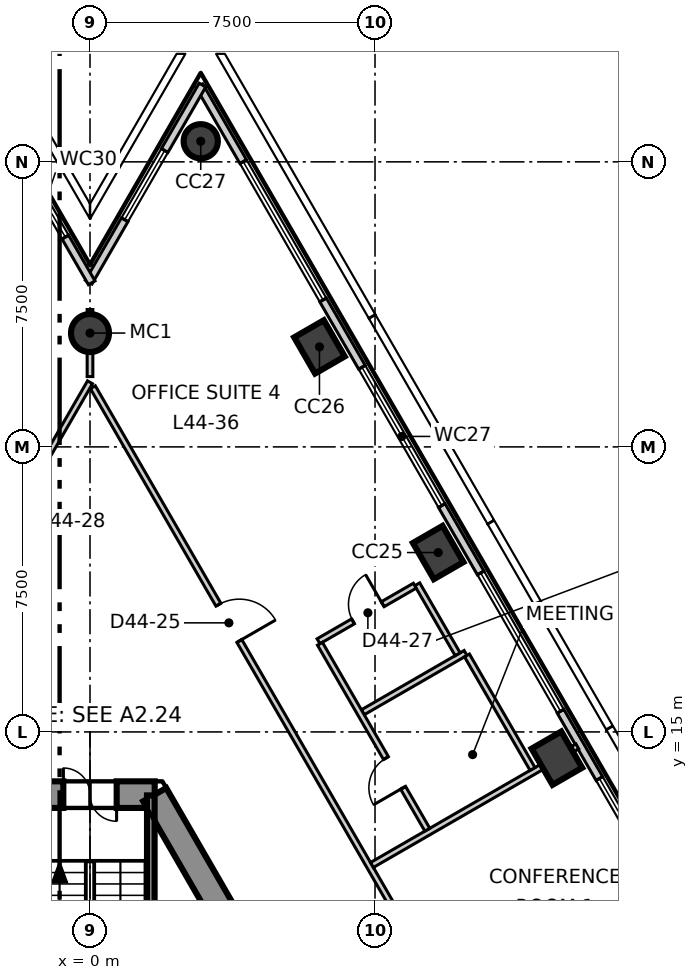
"""IFC4 building model, lengths in metres.
Left out: names, types, materials, properties, quantities, classifications, styles, units other than length and angle.
Written with IfcOpenShell. Run it as: python <this file> out.ifc"""

import sys

from ifc_helpers import new_model, si_unit, direction, frame, frame_2d, origin, origin_2d, place, context, subcontext, project, spatial, polyline, rectangle, circle, outline, extrude, element, fill, save


model = new_model("IFC4")
c1 = context("Model", 3, precision=1e-05, world=origin(), true_north=direction((0.0, 1.0)))
c2 = subcontext(c1, "Body", "Model", "MODEL_VIEW")
j1 = project(units=[si_unit("LENGTHUNIT", "METRE"), si_unit("PLANEANGLEUNIT", "RADIAN")], contexts=[c1])
p1 = place(None, origin())
s1 = spatial("IfcSite", under=j1, at=p1, CompositionType="ELEMENT")
p2 = place(p1, origin())
s2 = spatial("IfcBuilding", under=s1, at=p2, CompositionType="ELEMENT")
p3 = place(p2, frame((0.0, 0.0, 191.3)))
s3 = spatial("IfcBuildingStorey", under=s2, at=p3, CompositionType="ELEMENT", Elevation=191.3)
p4 = place(p3, frame((1.703, 13.35, -0.3), z_axis=(0.0, 0.0, 1.0), x_axis=(-1.0, 0.0, 0.0)))
e1 = element("IfcWall", 1, at=p4, inside=s3, PredefinedType="SHEAR", context=c2, shape_type="SweptSolid", body=[
    extrude(outline(polyline([(-0.202, -0.35), (1.703, -0.35), (3.608, -0.35), (3.204, 0.35), (1.703, 0.35), (0.202, 0.35), (-0.202, -0.35)])), origin(), (0.0, 0.0, 1.0), 4.0),
])
p5 = place(p4, frame((1.003, 0.0, 0.3)))
e2 = element("IfcOpeningElement", 2, at=p5, cuts=e1, PredefinedType="OPENING", context=c2, shape_type="SweptSolid", body=[
    extrude(rectangle(XDim=1.4, YDim=2.1, at=frame_2d((0.7, 1.05))), frame((0.0, 0.36, 0.0), z_axis=(0.0, -1.0, 0.0), x_axis=(1.0, 0.0, 0.0)), (0.0, 0.0, 1.0), 0.72),
])
p6 = place(p3, frame((12.413, -5.2, -0.3), z_axis=(0.0, 0.0, 1.0), x_axis=(-0.500011533395, 0.866018744874, 0.0)))
e3 = element("IfcWall", 3, at=p6, inside=s3, PredefinedType="SHEAR", context=c2, shape_type="SweptSolid", body=[
    extrude(outline(polyline([(-0.202, -0.35), (1.782, -0.35), (3.766, -0.35), (5.75, -0.35), (7.734, -0.35), (9.718, -0.35), (11.702, -0.35), (13.686, -0.35), (15.67, -0.35), (17.654, -0.35), (19.638, -0.35), (21.622, -0.35), (21.218, 0.35), (19.307, 0.35), (17.397, 0.35), (15.486, 0.35), (13.576, 0.35), (11.665, 0.35), (9.755, 0.35), (7.844, 0.35), (5.934, 0.35), (4.023, 0.35), (2.113, 0.35), (0.202, 0.35), (-0.202, -0.35)])), origin(), (0.0, 0.0, 1.0), 4.0),
])
p7 = place(p6, frame((4.055, 0.0, 0.3)))
e4 = element("IfcOpeningElement", 4, at=p7, cuts=e3, PredefinedType="OPENING", context=c2, shape_type="SweptSolid", body=[
    extrude(rectangle(XDim=0.9, YDim=2.1, at=frame_2d((0.45, 1.05))), frame((0.0, 0.36, 0.0), z_axis=(0.0, -1.0, 0.0), x_axis=(1.0, 0.0, 0.0)), (0.0, 0.0, 1.0), 0.72),
])
p8 = place(p6, frame((16.465, 0.0, 0.3)))
e5 = element("IfcOpeningElement", 5, at=p8, cuts=e3, PredefinedType="OPENING", context=c2, shape_type="SweptSolid", body=[
    extrude(rectangle(XDim=0.9, YDim=2.1, at=frame_2d((0.45, 1.05))), frame((0.0, 0.36, 0.0), z_axis=(0.0, -1.0, 0.0), x_axis=(1.0, 0.0, 0.0)), (0.0, 0.0, 1.0), 0.72),
])
for number, where, z_axis, x_axis in (
    (6, (12.286, 14.309, -0.3), (0.0, 0.0, 1.0), (-0.5, 0.866, 0.0)),
    (7, (9.162, 19.72, -0.3), (0.0, 0.0, 1.0), (-0.5, 0.866, 0.0)),
    (8, (6.038, 25.131, -0.3), (0.0, 0.0, 1.0), (-0.5, 0.866, 0.0)),
):
    element("IfcColumn", number, at=place(p3, frame(where, z_axis=z_axis, x_axis=x_axis)), inside=s3, PredefinedType="COLUMN", context=c2, shape_type="SweptSolid", body=[
        extrude(rectangle(XDim=1.1, YDim=0.9, at=origin_2d()), origin(), (0.0, 0.0, 1.0), 4.0),
    ])
p9 = place(p3, frame((2.914, 30.542, -0.3), z_axis=(0.0, 0.0, 1.0), x_axis=(-0.5, 0.866025403784, 0.0)))
e9 = element("IfcColumn", 9, at=p9, inside=s3, PredefinedType="COLUMN", context=c2, shape_type="SweptSolid", body=[
    extrude(circle(Radius=0.45, at=origin_2d()), origin(), (0.0, 0.0, 1.0), 4.0),
])
p10 = place(p3, frame((0.0, 25.495, -0.3), z_axis=(0.0, 0.0, 1.0), x_axis=(1.0, 0.0, 0.0)))
e10 = element("IfcColumn", 10, at=p10, inside=s3, PredefinedType="COLUMN", context=c2, shape_type="SweptSolid", body=[
    extrude(circle(Radius=0.5, at=origin_2d()), origin(), (0.0, 0.0, 1.0), 4.0),
])
p11 = place(p3, frame((29.165, -13.525, 0.0), z_axis=(0.0, 0.0, 1.0), x_axis=(-0.500008941164, 0.86602024154, 0.0)))
e11 = element("IfcWall", 11, at=p11, inside=s3, PredefinedType="ELEMENTEDWALL", context=c2, shape_type="SweptSolid", body=[
    extrude(rectangle(XDim=52.571, YDim=0.2, at=frame_2d((26.286, 0.0))), origin(), (0.0, 0.0, 1.0), 3.7),
])
p12 = place(p11, frame((2.327, 0.0, 0.9)))
e12 = element("IfcOpeningElement", 12, at=p12, cuts=e11, PredefinedType="OPENING", context=c2, shape_type="SweptSolid", body=[
    extrude(rectangle(XDim=4.2, YDim=2.5, at=frame_2d((2.1, 1.25))), frame((0.0, 0.11, 0.0), z_axis=(0.0, -1.0, 0.0), x_axis=(1.0, 0.0, 0.0)), (0.0, 0.0, 1.0), 0.22),
])
p13 = place(p11, frame((8.575, 0.0, 0.9)))
e13 = element("IfcOpeningElement", 13, at=p13, cuts=e11, PredefinedType="OPENING", context=c2, shape_type="SweptSolid", body=[
    extrude(rectangle(XDim=4.2, YDim=2.5, at=frame_2d((2.1, 1.25))), frame((0.0, 0.11, 0.0), z_axis=(0.0, -1.0, 0.0), x_axis=(1.0, 0.0, 0.0)), (0.0, 0.0, 1.0), 0.22),
])
p14 = place(p11, frame((14.823, 0.0, 0.9)))
e14 = element("IfcOpeningElement", 14, at=p14, cuts=e11, PredefinedType="OPENING", context=c2, shape_type="SweptSolid", body=[
    extrude(rectangle(XDim=4.2, YDim=2.5, at=frame_2d((2.1, 1.25))), frame((0.0, 0.11, 0.0), z_axis=(0.0, -1.0, 0.0), x_axis=(1.0, 0.0, 0.0)), (0.0, 0.0, 1.0), 0.22),
])
p15 = place(p11, frame((21.072, 0.0, 0.9)))
e15 = element("IfcOpeningElement", 15, at=p15, cuts=e11, PredefinedType="OPENING", context=c2, shape_type="SweptSolid", body=[
    extrude(rectangle(XDim=4.2, YDim=2.5, at=frame_2d((2.1, 1.25))), frame((0.0, 0.11, 0.0), z_axis=(0.0, -1.0, 0.0), x_axis=(1.0, 0.0, 0.0)), (0.0, 0.0, 1.0), 0.22),
])
p16 = place(p11, frame((27.32, 0.0, 0.9)))
e16 = element("IfcOpeningElement", 16, at=p16, cuts=e11, PredefinedType="OPENING", context=c2, shape_type="SweptSolid", body=[
    extrude(rectangle(XDim=4.2, YDim=2.5, at=frame_2d((2.1, 1.25))), frame((0.0, 0.11, 0.0), z_axis=(0.0, -1.0, 0.0), x_axis=(1.0, 0.0, 0.0)), (0.0, 0.0, 1.0), 0.22),
])
p17 = place(p11, frame((33.568, 0.0, 0.9)))
e17 = element("IfcOpeningElement", 17, at=p17, cuts=e11, PredefinedType="OPENING", context=c2, shape_type="SweptSolid", body=[
    extrude(rectangle(XDim=4.2, YDim=2.5, at=frame_2d((2.1, 1.25))), frame((0.0, 0.11, 0.0), z_axis=(0.0, -1.0, 0.0), x_axis=(1.0, 0.0, 0.0)), (0.0, 0.0, 1.0), 0.22),
])
p18 = place(p11, frame((39.816, 0.0, 0.9)))
e18 = element("IfcOpeningElement", 18, at=p18, cuts=e11, PredefinedType="OPENING", context=c2, shape_type="SweptSolid", body=[
    extrude(rectangle(XDim=4.2, YDim=2.5, at=frame_2d((2.1, 1.25))), frame((0.0, 0.11, 0.0), z_axis=(0.0, -1.0, 0.0), x_axis=(1.0, 0.0, 0.0)), (0.0, 0.0, 1.0), 0.22),
])
p19 = place(p11, frame((46.064, 0.0, 0.9)))
e19 = element("IfcOpeningElement", 19, at=p19, cuts=e11, PredefinedType="OPENING", context=c2, shape_type="SweptSolid", body=[
    extrude(rectangle(XDim=4.2, YDim=2.5, at=frame_2d((2.1, 1.25))), frame((0.0, 0.11, 0.0), z_axis=(0.0, -1.0, 0.0), x_axis=(1.0, 0.0, 0.0)), (0.0, 0.0, 1.0), 0.22),
])
p20 = place(p3, frame((2.959, 32.02, 0.0), z_axis=(0.0, 0.0, 1.0), x_axis=(-0.499967146315, -0.866044371037, 0.0)))
e20 = element("IfcWall", 20, at=p20, inside=s3, PredefinedType="ELEMENTEDWALL", context=c2, shape_type="SweptSolid", body=[
    extrude(rectangle(XDim=5.988, YDim=0.2, at=frame_2d((2.994, 0.0))), origin(), (0.0, 0.0, 1.0), 3.7),
])
p21 = place(p20, frame((1.99, 0.0, 0.9)))
e21 = element("IfcOpeningElement", 21, at=p21, cuts=e20, PredefinedType="OPENING", context=c2, shape_type="SweptSolid", body=[
    extrude(rectangle(XDim=2.1, YDim=2.5, at=frame_2d((1.05, 1.25))), frame((0.0, 0.11, 0.0), z_axis=(0.0, -1.0, 0.0), x_axis=(1.0, 0.0, 0.0)), (0.0, 0.0, 1.0), 0.22),
])
p22 = place(p3, frame((0.045, 26.817, 0.0), z_axis=(0.0, 0.0, 1.0), x_axis=(-0.499967146315, 0.866044371037, 0.0)))
e22 = element("IfcWall", 22, at=p22, inside=s3, PredefinedType="ELEMENTEDWALL", context=c2, shape_type="SweptSolid", body=[
    extrude(rectangle(XDim=5.988, YDim=0.2, at=frame_2d((2.994, 0.0))), origin(), (0.0, 0.0, 1.0), 3.7),
])
p23 = place(p22, frame((1.39, 0.0, 0.9)))
e23 = element("IfcOpeningElement", 23, at=p23, cuts=e22, PredefinedType="OPENING", context=c2, shape_type="SweptSolid", body=[
    extrude(rectangle(XDim=2.1, YDim=2.5, at=frame_2d((1.05, 1.25))), frame((0.0, 0.11, 0.0), z_axis=(0.0, -1.0, 0.0), x_axis=(1.0, 0.0, 0.0)), (0.0, 0.0, 1.0), 0.22),
])
p24 = place(p3, frame((-20.882, -11.969, 0.0), z_axis=(0.0, 0.0, 1.0), x_axis=(0.499998738735, 0.866026131975, 0.0)))
e24 = element("IfcWall", 24, at=p24, inside=s3, PredefinedType="PARTITIONING", context=c2, shape_type="SweptSolid", body=[
    extrude(rectangle(XDim=41.764, YDim=0.15, at=frame_2d((20.882, 0.0))), origin(), (0.0, 0.0, 1.0), 3.7),
])
p25 = place(p24, frame((37.014, 0.0, 0.0)))
e25 = element("IfcOpeningElement", 25, at=p25, cuts=e24, PredefinedType="OPENING", context=c2, shape_type="SweptSolid", body=[
    extrude(rectangle(XDim=1.0, YDim=2.1, at=frame_2d((0.5, 1.05))), frame((0.0, 0.085, 0.0), z_axis=(0.0, -1.0, 0.0), x_axis=(1.0, 0.0, 0.0)), (0.0, 0.0, 1.0), 0.17),
])
p26 = place(p24, frame((29.653, 0.0, 0.0)))
e26 = element("IfcOpeningElement", 26, at=p26, cuts=e24, PredefinedType="OPENING", context=c2, shape_type="SweptSolid", body=[
    extrude(rectangle(XDim=1.0, YDim=2.1, at=frame_2d((0.5, 1.05))), frame((0.0, 0.085, 0.0), z_axis=(0.0, -1.0, 0.0), x_axis=(1.0, 0.0, 0.0)), (0.0, 0.0, 1.0), 0.17),
])
p27 = place(p24, frame((23.405, 0.0, 0.0)))
e27 = element("IfcOpeningElement", 27, at=p27, cuts=e24, PredefinedType="OPENING", context=c2, shape_type="SweptSolid", body=[
    extrude(rectangle(XDim=1.0, YDim=2.1, at=frame_2d((0.5, 1.05))), frame((0.0, 0.085, 0.0), z_axis=(0.0, -1.0, 0.0), x_axis=(1.0, 0.0, 0.0)), (0.0, 0.0, 1.0), 0.17),
])
p28 = place(p24, frame((9.657, 0.0, 0.0)))
e28 = element("IfcOpeningElement", 28, at=p28, cuts=e24, PredefinedType="OPENING", context=c2, shape_type="SweptSolid", body=[
    extrude(rectangle(XDim=1.1, YDim=2.1, at=frame_2d((0.55, 1.05))), frame((0.0, 0.085, 0.0), z_axis=(0.0, -1.0, 0.0), x_axis=(1.0, 0.0, 0.0)), (0.0, 0.0, 1.0), 0.17),
])
p29 = place(p24, frame((18.757, 0.0, 0.0)))
e29 = element("IfcOpeningElement", 29, at=p29, cuts=e24, PredefinedType="OPENING", context=c2, shape_type="SweptSolid", body=[
    extrude(rectangle(XDim=0.9, YDim=2.1, at=frame_2d((0.45, 1.05))), frame((0.0, 0.085, 0.0), z_axis=(0.0, -1.0, 0.0), x_axis=(1.0, 0.0, 0.0)), (0.0, 0.0, 1.0), 0.17),
])
p30 = place(p24, frame((15.557, 0.0, 0.0)))
e30 = element("IfcOpeningElement", 30, at=p30, cuts=e24, PredefinedType="OPENING", context=c2, shape_type="SweptSolid", body=[
    extrude(rectangle(XDim=0.9, YDim=2.1, at=frame_2d((0.45, 1.05))), frame((0.0, 0.085, 0.0), z_axis=(0.0, -1.0, 0.0), x_axis=(1.0, 0.0, 0.0)), (0.0, 0.0, 1.0), 0.17),
])
p31 = place(p24, frame((12.657, 0.0, 0.0)))
e31 = element("IfcOpeningElement", 31, at=p31, cuts=e24, PredefinedType="OPENING", context=c2, shape_type="SweptSolid", body=[
    extrude(rectangle(XDim=1.0, YDim=2.1, at=frame_2d((0.5, 1.05))), frame((0.0, 0.085, 0.0), z_axis=(0.0, -1.0, 0.0), x_axis=(1.0, 0.0, 0.0)), (0.0, 0.0, 1.0), 0.17),
])
p32 = place(p24, frame((3.56, 0.0, 0.0)))
e32 = element("IfcOpeningElement", 32, at=p32, cuts=e24, PredefinedType="OPENING", context=c2, shape_type="SweptSolid", body=[
    extrude(rectangle(XDim=1.1, YDim=2.1, at=frame_2d((0.55, 1.05))), frame((0.0, 0.085, 0.0), z_axis=(0.0, -1.0, 0.0), x_axis=(1.0, 0.0, 0.0)), (0.0, 0.0, 1.0), 0.17),
])
p33 = place(p3, frame((0.0, 24.35, 0.0), z_axis=(0.0, 0.0, 1.0), x_axis=(0.0, 1.0, 0.0)))
e33 = element("IfcWall", 33, at=p33, inside=s3, PredefinedType="PARTITIONING", context=c2, shape_type="SweptSolid", body=[
    extrude(rectangle(XDim=1.765, YDim=0.15, at=frame_2d((0.882, 0.0))), origin(), (0.0, 0.0, 1.0), 3.2),
])
p34 = place(p3, frame((0.075, 24.07, 0.0), z_axis=(0.0, 0.0, 1.0), x_axis=(0.49999939571, -0.866025752671, 0.0)))
e34 = element("IfcWall", 34, at=p34, inside=s3, PredefinedType="PARTITIONING", context=c2, shape_type="SweptSolid", body=[
    extrude(rectangle(XDim=41.614, YDim=0.15, at=frame_2d((20.807, 0.0))), origin(), (0.0, 0.0, 1.0), 3.7),
])
p35 = place(p34, frame((37.015, 0.0, 0.0)))
e35 = element("IfcOpeningElement", 35, at=p35, cuts=e34, PredefinedType="OPENING", context=c2, shape_type="SweptSolid", body=[
    extrude(rectangle(XDim=1.1, YDim=2.1, at=frame_2d((0.55, 1.05))), frame((0.0, 0.085, 0.0), z_axis=(0.0, -1.0, 0.0), x_axis=(1.0, 0.0, 0.0)), (0.0, 0.0, 1.0), 0.17),
])
p36 = place(p34, frame((25.154, 0.0, 0.0)))
e36 = element("IfcOpeningElement", 36, at=p36, cuts=e34, PredefinedType="OPENING", context=c2, shape_type="SweptSolid", body=[
    extrude(rectangle(XDim=1.0, YDim=2.1, at=frame_2d((0.5, 1.05))), frame((0.0, 0.085, 0.0), z_axis=(0.0, -1.0, 0.0), x_axis=(1.0, 0.0, 0.0)), (0.0, 0.0, 1.0), 0.17),
])
p37 = place(p34, frame((31.454, 0.0, 0.0)))
e37 = element("IfcOpeningElement", 37, at=p37, cuts=e34, PredefinedType="OPENING", context=c2, shape_type="SweptSolid", body=[
    extrude(rectangle(XDim=0.9, YDim=2.1, at=frame_2d((0.45, 1.05))), frame((0.0, 0.085, 0.0), z_axis=(0.0, -1.0, 0.0), x_axis=(1.0, 0.0, 0.0)), (0.0, 0.0, 1.0), 0.17),
])
p38 = place(p34, frame((17.157, 0.0, 0.0)))
e38 = element("IfcOpeningElement", 38, at=p38, cuts=e34, PredefinedType="OPENING", context=c2, shape_type="SweptSolid", body=[
    extrude(rectangle(XDim=1.0, YDim=2.1, at=frame_2d((0.5, 1.05))), frame((0.0, 0.085, 0.0), z_axis=(0.0, -1.0, 0.0), x_axis=(1.0, 0.0, 0.0)), (0.0, 0.0, 1.0), 0.17),
])
p39 = place(p34, frame((6.609, 0.0, 0.0)))
e39 = element("IfcOpeningElement", 39, at=p39, cuts=e34, PredefinedType="OPENING", context=c2, shape_type="SweptSolid", body=[
    extrude(rectangle(XDim=1.1, YDim=2.1, at=frame_2d((0.55, 1.05))), frame((0.0, 0.085, 0.0), z_axis=(0.0, -1.0, 0.0), x_axis=(1.0, 0.0, 0.0)), (0.0, 0.0, 1.0), 0.17),
])
p40 = place(p3, frame((7.419, 11.499, 0.0), z_axis=(0.0, 0.0, 1.0), x_axis=(0.866036385336, 0.499980978912, 0.0)))
e40 = element("IfcWall", 40, at=p40, inside=s3, PredefinedType="PARTITIONING", context=c2, shape_type="SweptSolid", body=[
    extrude(rectangle(XDim=6.24, YDim=0.15, at=frame_2d((3.12, 0.0))), origin(), (0.0, 0.0, 1.0), 3.7),
])
p41 = place(p3, frame((7.178, 15.517, 0.0), z_axis=(0.0, 0.0, 1.0), x_axis=(0.866084027935, 0.499898446243, 0.0)))
e41 = element("IfcWall", 41, at=p41, inside=s3, PredefinedType="PARTITIONING", context=c2, shape_type="SweptSolid", body=[
    extrude(rectangle(XDim=3.122, YDim=0.15, at=frame_2d((1.561, 0.0))), origin(), (0.0, 0.0, 1.0), 3.7),
])
p42 = place(p3, frame((8.611, 18.885, 0.0), z_axis=(0.0, 0.0, 1.0), x_axis=(0.500017365573, -0.866015377534, 0.0)))
e42 = element("IfcWall", 42, at=p42, inside=s3, PredefinedType="PARTITIONING", context=c2, shape_type="SweptSolid", body=[
    extrude(rectangle(XDim=2.126, YDim=0.15, at=frame_2d((1.063, 0.0))), origin(), (0.0, 0.0, 1.0), 3.7),
])
p43 = place(p3, frame((6.013, 17.385, 0.0), z_axis=(0.0, 0.0, 1.0), x_axis=(0.866098016745, 0.499874209568, 0.0)))
e43 = element("IfcWall", 43, at=p43, inside=s3, PredefinedType="PARTITIONING", context=c2, shape_type="SweptSolid", body=[
    extrude(rectangle(XDim=2.925, YDim=0.15, at=frame_2d((1.462, 0.0))), origin(), (0.0, 0.0, 1.0), 3.7),
])
p44 = place(p43, frame((1.05, 0.0, 0.0)))
e44 = element("IfcOpeningElement", 44, at=p44, cuts=e43, PredefinedType="OPENING", context=c2, shape_type="SweptSolid", body=[
    extrude(rectangle(XDim=0.9, YDim=2.1, at=frame_2d((0.45, 1.05))), frame((0.0, 0.085, 0.0), z_axis=(0.0, -1.0, 0.0), x_axis=(1.0, 0.0, 0.0)), (0.0, 0.0, 1.0), 0.17),
])
p45 = place(p3, frame((6.051, 17.32, 0.0), z_axis=(0.0, 0.0, 1.0), x_axis=(0.499991765245, -0.86603015807, 0.0)))
e45 = element("IfcWall", 45, at=p45, inside=s3, PredefinedType="PARTITIONING", context=c2, shape_type="SweptSolid", body=[
    extrude(rectangle(XDim=5.65, YDim=0.15, at=frame_2d((2.825, 0.0))), origin(), (0.0, 0.0, 1.0), 3.7),
])
p46 = place(p45, frame((3.475, 0.0, 0.0)))
e46 = element("IfcOpeningElement", 46, at=p46, cuts=e45, PredefinedType="OPENING", context=c2, shape_type="SweptSolid", body=[
    extrude(rectangle(XDim=0.9, YDim=2.1, at=frame_2d((0.45, 1.05))), frame((0.0, 0.085, 0.0), z_axis=(0.0, -1.0, 0.0), x_axis=(1.0, 0.0, 0.0)), (0.0, 0.0, 1.0), 0.17),
])
p47 = place(p3, frame((9.92, 17.013, 0.0), z_axis=(0.0, 0.0, 1.0), x_axis=(0.49998991961, -0.866031223622, 0.0)))
e47 = element("IfcWall", 47, at=p47, inside=s3, PredefinedType="PARTITIONING", context=c2, shape_type="SweptSolid", body=[
    extrude(rectangle(XDim=3.45, YDim=0.15, at=frame_2d((1.725, 0.0))), origin(), (0.0, 0.0, 1.0), 3.7),
])
p48 = place(p3, frame((1.6, 6.615, 0.0), z_axis=(0.0, 0.0, 1.0), x_axis=(0.0, 1.0, 0.0)))
e48 = element("IfcWall", 48, at=p48, inside=s3, PredefinedType="SOLIDWALL", context=c2, shape_type="SweptSolid", body=[
    extrude(rectangle(XDim=6.715, YDim=0.2, at=frame_2d((3.357, 0.0))), origin(), (0.0, 0.0, 1.0), 3.7),
])
p49 = place(p16, origin())
e49 = element("IfcWindow", 49, at=p49, inside=s3, PartitioningType="SINGLE_PANEL", PredefinedType="WINDOW", context=c2, shape_type="SweptSolid", body=[
    extrude(rectangle(XDim=4.2, YDim=2.5, at=frame_2d((2.1, 1.25))), frame((0.0, 0.03, 0.0), z_axis=(0.0, -1.0, 0.0), x_axis=(1.0, 0.0, 0.0)), (0.0, 0.0, 1.0), 0.06),
])
fill(e16, e49)
p50 = place(p17, origin())
e50 = element("IfcWindow", 50, at=p50, inside=s3, PartitioningType="SINGLE_PANEL", PredefinedType="WINDOW", context=c2, shape_type="SweptSolid", body=[
    extrude(rectangle(XDim=4.2, YDim=2.5, at=frame_2d((2.1, 1.25))), frame((0.0, 0.03, 0.0), z_axis=(0.0, -1.0, 0.0), x_axis=(1.0, 0.0, 0.0)), (0.0, 0.0, 1.0), 0.06),
])
fill(e17, e50)
p51 = place(p18, origin())
e51 = element("IfcWindow", 51, at=p51, inside=s3, PartitioningType="SINGLE_PANEL", PredefinedType="WINDOW", context=c2, shape_type="SweptSolid", body=[
    extrude(rectangle(XDim=4.2, YDim=2.5, at=frame_2d((2.1, 1.25))), frame((0.0, 0.03, 0.0), z_axis=(0.0, -1.0, 0.0), x_axis=(1.0, 0.0, 0.0)), (0.0, 0.0, 1.0), 0.06),
])
fill(e18, e51)
p52 = place(p19, origin())
e52 = element("IfcWindow", 52, at=p52, inside=s3, PartitioningType="SINGLE_PANEL", PredefinedType="WINDOW", context=c2, shape_type="SweptSolid", body=[
    extrude(rectangle(XDim=4.2, YDim=2.5, at=frame_2d((2.1, 1.25))), frame((0.0, 0.03, 0.0), z_axis=(0.0, -1.0, 0.0), x_axis=(1.0, 0.0, 0.0)), (0.0, 0.0, 1.0), 0.06),
])
fill(e19, e52)
p53 = place(p21, origin())
e53 = element("IfcWindow", 53, at=p53, inside=s3, PartitioningType="SINGLE_PANEL", PredefinedType="WINDOW", context=c2, shape_type="SweptSolid", body=[
    extrude(rectangle(XDim=2.1, YDim=2.5, at=frame_2d((1.05, 1.25))), frame((0.0, 0.03, 0.0), z_axis=(0.0, -1.0, 0.0), x_axis=(1.0, 0.0, 0.0)), (0.0, 0.0, 1.0), 0.06),
])
fill(e21, e53)
p54 = place(p23, origin())
e54 = element("IfcWindow", 54, at=p54, inside=s3, PartitioningType="SINGLE_PANEL", PredefinedType="WINDOW", context=c2, shape_type="SweptSolid", body=[
    extrude(rectangle(XDim=2.1, YDim=2.5, at=frame_2d((1.05, 1.25))), frame((0.0, 0.03, 0.0), z_axis=(0.0, -1.0, 0.0), x_axis=(1.0, 0.0, 0.0)), (0.0, 0.0, 1.0), 0.06),
])
fill(e23, e54)
p55 = place(p39, origin())
e55 = element("IfcDoor", 55, at=p55, inside=s3, OperationType="SINGLE_SWING_LEFT", PredefinedType="DOOR", context=c2, shape_type="SweptSolid", body=[
    extrude(rectangle(XDim=1.1, YDim=2.1, at=frame_2d((0.55, 1.05))), frame((0.0, 0.025, 0.0), z_axis=(0.0, -1.0, 0.0), x_axis=(1.0, 0.0, 0.0)), (0.0, 0.0, 1.0), 0.05),
])
fill(e39, e55)
p56 = place(p46, origin())
e56 = element("IfcDoor", 56, at=p56, inside=s3, OperationType="SINGLE_SWING_RIGHT", PredefinedType="DOOR", context=c2, shape_type="SweptSolid", body=[
    extrude(rectangle(XDim=0.9, YDim=2.1, at=frame_2d((0.45, 1.05))), frame((0.0, 0.025, 0.0), z_axis=(0.0, -1.0, 0.0), x_axis=(1.0, 0.0, 0.0)), (0.0, 0.0, 1.0), 0.05),
])
fill(e46, e56)
p57 = place(p44, origin())
e57 = element("IfcDoor", 57, at=p57, inside=s3, OperationType="SINGLE_SWING_LEFT", PredefinedType="DOOR", context=c2, shape_type="SweptSolid", body=[
    extrude(rectangle(XDim=0.9, YDim=2.1, at=frame_2d((0.45, 1.05))), frame((0.0, 0.025, 0.0), z_axis=(0.0, -1.0, 0.0), x_axis=(1.0, 0.0, 0.0)), (0.0, 0.0, 1.0), 0.05),
])
fill(e44, e57)
p58 = place(p5, origin())
e58 = element("IfcDoor", 58, at=p58, inside=s3, OperationType="DOUBLE_DOOR_SINGLE_SWING", PredefinedType="DOOR", context=c2, shape_type="SweptSolid", body=[
    extrude(rectangle(XDim=1.4, YDim=2.1, at=frame_2d((0.7, 1.05))), frame((0.0, 0.025, 0.0), z_axis=(0.0, -1.0, 0.0), x_axis=(1.0, 0.0, 0.0)), (0.0, 0.0, 1.0), 0.05),
])
fill(e2, e58)
save(model, sys.argv[1])
